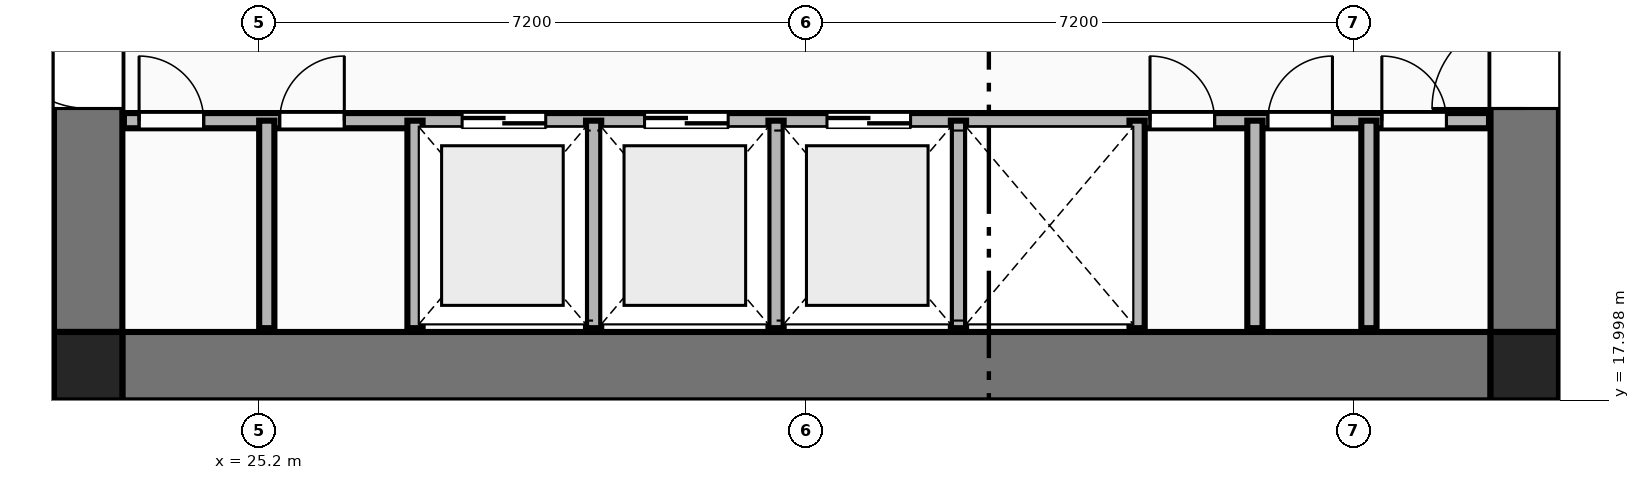
"""IFC4 building model, lengths in metres.
Left out: names, types, materials, properties, quantities, classifications, styles, units other than length and angle.
Written with IfcOpenShell. Run it as: python <this file> out.ifc"""

import sys

from ifc_helpers import new_model, si_unit, direction, frame, frame_2d, origin, origin_2d, place, context, subcontext, project, spatial, rectangle, extrude, element, fill, save


model = new_model("IFC4")
c1 = context("Model", 3, precision=1e-05, world=origin(), true_north=direction((0.0, 1.0)))
c2 = subcontext(c1, "Body", "Model", "MODEL_VIEW")
j1 = project(units=[si_unit("LENGTHUNIT", "METRE"), si_unit("PLANEANGLEUNIT", "RADIAN")], contexts=[c1])
p1 = place(None, origin())
s1 = spatial("IfcSite", under=j1, at=p1, CompositionType="ELEMENT")
p2 = place(p1, origin())
s2 = spatial("IfcBuilding", under=s1, at=p2, CompositionType="ELEMENT")
p3 = place(p2, frame((0.0, 0.0, 46.2)))
s3 = spatial("IfcBuildingStorey", under=s2, at=p3, CompositionType="ELEMENT", Elevation=46.2)
for number, where, z_axis, x_axis in (
    (1, (22.95, 18.45, 0.0), (0.0, 0.0, 1.0), (1.0, 0.0, 0.0)),
    (2, (41.85, 18.45, 0.0), (0.0, 0.0, 1.0), (1.0, 0.0, 0.0)),
):
    element("IfcColumn", number, at=place(p3, frame(where, z_axis=z_axis, x_axis=x_axis)), inside=s3, PredefinedType="COLUMN", context=c2, shape_type="SweptSolid", body=[
        extrude(rectangle(XDim=0.9, YDim=0.9, at=origin_2d()), origin(), (0.0, 0.0, 1.0), 3.55),
    ])
p4 = place(p3, frame((23.4, 18.45, 0.0), z_axis=(0.0, 0.0, 1.0), x_axis=(1.0, 0.0, 0.0)))
e3 = element("IfcWall", 3, at=p4, inside=s3, PredefinedType="SHEAR", context=c2, shape_type="SweptSolid", body=[
    extrude(rectangle(XDim=18.0, YDim=0.9, at=frame_2d((9.0, 0.0))), origin(), (0.0, 0.0, 1.0), 3.33),
])
p5 = place(p3, frame((22.95, 18.9, 0.0), z_axis=(0.0, 0.0, 1.0), x_axis=(0.0, 1.0, 0.0)))
e4 = element("IfcWall", 4, at=p5, inside=s3, PredefinedType="SHEAR", context=c2, shape_type="SweptSolid", body=[
    extrude(rectangle(XDim=14.0, YDim=0.9, at=frame_2d((7.0, 0.0))), origin(), (0.0, 0.0, 1.0), 3.33),
])
p6 = place(p5, frame((2.94, 0.0, 0.0)))
e5 = element("IfcOpeningElement", 5, at=p6, cuts=e4, PredefinedType="OPENING", context=c2, shape_type="SweptSolid", body=[
    extrude(rectangle(XDim=1.22, YDim=2.25, at=frame_2d((0.61, 1.125))), frame((0.0, 0.46, 0.0), z_axis=(0.0, -1.0, 0.0), x_axis=(1.0, 0.0, 0.0)), (0.0, 0.0, 1.0), 0.92),
])
p7 = place(p3, frame((41.85, 18.9, 0.0), z_axis=(0.0, 0.0, 1.0), x_axis=(0.0, 1.0, 0.0)))
e6 = element("IfcWall", 6, at=p7, inside=s3, PredefinedType="SHEAR", context=c2, shape_type="SweptSolid", body=[
    extrude(rectangle(XDim=14.0, YDim=0.9, at=frame_2d((7.0, 0.0))), origin(), (0.0, 0.0, 1.0), 3.33),
])
p8 = place(p7, frame((2.94, 0.0, 0.0)))
e7 = element("IfcOpeningElement", 7, at=p8, cuts=e6, PredefinedType="OPENING", context=c2, shape_type="SweptSolid", body=[
    extrude(rectangle(XDim=1.22, YDim=2.25, at=frame_2d((0.61, 1.125))), frame((0.0, 0.46, 0.0), z_axis=(0.0, -1.0, 0.0), x_axis=(1.0, 0.0, 0.0)), (0.0, 0.0, 1.0), 0.92),
])
p9 = place(p3, frame((23.42, 21.68, 0.0), z_axis=(0.0, 0.0, 1.0), x_axis=(1.0, 0.0, 0.0)))
e8 = element("IfcWall", 8, at=p9, inside=s3, PredefinedType="PLUMBINGWALL", context=c2, shape_type="SweptSolid", body=[
    extrude(rectangle(XDim=17.96, YDim=0.2, at=frame_2d((8.98, 0.0))), origin(), (0.0, 0.0, 1.0), 3.33),
])
p10 = place(p9, frame((4.45, 0.0, 0.0)))
e9 = element("IfcOpeningElement", 9, at=p10, cuts=e8, PredefinedType="OPENING", context=c2, shape_type="SweptSolid", body=[
    extrude(rectangle(XDim=1.1, YDim=2.2, at=frame_2d((0.55, 1.1))), frame((0.0, 0.11, 0.0), z_axis=(0.0, -1.0, 0.0), x_axis=(1.0, 0.0, 0.0)), (0.0, 0.0, 1.0), 0.22),
])
p11 = place(p9, frame((6.85, 0.0, 0.0)))
e10 = element("IfcOpeningElement", 10, at=p11, cuts=e8, PredefinedType="OPENING", context=c2, shape_type="SweptSolid", body=[
    extrude(rectangle(XDim=1.1, YDim=2.2, at=frame_2d((0.55, 1.1))), frame((0.0, 0.11, 0.0), z_axis=(0.0, -1.0, 0.0), x_axis=(1.0, 0.0, 0.0)), (0.0, 0.0, 1.0), 0.22),
])
p12 = place(p9, frame((9.25, 0.0, 0.0)))
e11 = element("IfcOpeningElement", 11, at=p12, cuts=e8, PredefinedType="OPENING", context=c2, shape_type="SweptSolid", body=[
    extrude(rectangle(XDim=1.1, YDim=2.2, at=frame_2d((0.55, 1.1))), frame((0.0, 0.11, 0.0), z_axis=(0.0, -1.0, 0.0), x_axis=(1.0, 0.0, 0.0)), (0.0, 0.0, 1.0), 0.22),
])
p13 = place(p9, frame((0.2, 0.0, 0.0)))
e12 = element("IfcOpeningElement", 12, at=p13, cuts=e8, PredefinedType="OPENING", context=c2, shape_type="SweptSolid", body=[
    extrude(rectangle(XDim=0.85, YDim=2.05, at=frame_2d((0.425, 1.025))), frame((0.0, 0.11, 0.0), z_axis=(0.0, -1.0, 0.0), x_axis=(1.0, 0.0, 0.0)), (0.0, 0.0, 1.0), 0.22),
])
p14 = place(p9, frame((2.05, 0.0, 0.0)))
e13 = element("IfcOpeningElement", 13, at=p14, cuts=e8, PredefinedType="OPENING", context=c2, shape_type="SweptSolid", body=[
    extrude(rectangle(XDim=0.85, YDim=2.05, at=frame_2d((0.425, 1.025))), frame((0.0, 0.11, 0.0), z_axis=(0.0, -1.0, 0.0), x_axis=(1.0, 0.0, 0.0)), (0.0, 0.0, 1.0), 0.22),
])
p15 = place(p9, frame((13.5, 0.0, 0.0)))
e14 = element("IfcOpeningElement", 14, at=p15, cuts=e8, PredefinedType="OPENING", context=c2, shape_type="SweptSolid", body=[
    extrude(rectangle(XDim=0.85, YDim=2.05, at=frame_2d((0.425, 1.025))), frame((0.0, 0.11, 0.0), z_axis=(0.0, -1.0, 0.0), x_axis=(1.0, 0.0, 0.0)), (0.0, 0.0, 1.0), 0.22),
])
p16 = place(p9, frame((15.05, 0.0, 0.0)))
e15 = element("IfcOpeningElement", 15, at=p16, cuts=e8, PredefinedType="OPENING", context=c2, shape_type="SweptSolid", body=[
    extrude(rectangle(XDim=0.85, YDim=2.05, at=frame_2d((0.425, 1.025))), frame((0.0, 0.11, 0.0), z_axis=(0.0, -1.0, 0.0), x_axis=(1.0, 0.0, 0.0)), (0.0, 0.0, 1.0), 0.22),
])
p17 = place(p9, frame((16.55, 0.0, 0.0)))
e16 = element("IfcOpeningElement", 16, at=p17, cuts=e8, PredefinedType="OPENING", context=c2, shape_type="SweptSolid", body=[
    extrude(rectangle(XDim=0.85, YDim=2.05, at=frame_2d((0.425, 1.025))), frame((0.0, 0.11, 0.0), z_axis=(0.0, -1.0, 0.0), x_axis=(1.0, 0.0, 0.0)), (0.0, 0.0, 1.0), 0.22),
])
for number, where, z_axis, x_axis in (
    (17, (27.25, 18.95, 0.0), (0.0, 0.0, 1.0), (0.0, 1.0, 0.0)),
    (18, (29.6, 18.95, 0.0), (0.0, 0.0, 1.0), (0.0, 1.0, 0.0)),
    (19, (32.0, 18.95, 0.0), (0.0, 0.0, 1.0), (0.0, 1.0, 0.0)),
    (20, (34.4, 18.95, 0.0), (0.0, 0.0, 1.0), (0.0, 1.0, 0.0)),
    (21, (36.75, 18.95, 0.0), (0.0, 0.0, 1.0), (0.0, 1.0, 0.0)),
    (22, (25.3, 18.95, 0.0), (0.0, 0.0, 1.0), (0.0, 1.0, 0.0)),
    (23, (38.3, 18.95, 0.0), (0.0, 0.0, 1.0), (0.0, 1.0, 0.0)),
    (24, (39.8, 18.95, 0.0), (0.0, 0.0, 1.0), (0.0, 1.0, 0.0)),
):
    element("IfcWall", number, at=place(p3, frame(where, z_axis=z_axis, x_axis=x_axis)), inside=s3, PredefinedType="PLUMBINGWALL", context=c2, shape_type="SweptSolid", body=[
        extrude(rectangle(XDim=2.73, YDim=0.2, at=frame_2d((1.365, 0.0))), origin(), (0.0, 0.0, 1.0), 3.33),
    ])
p18 = place(p6, origin())
e25 = element("IfcDoor", 25, at=p18, inside=s3, OperationType="SINGLE_SWING_RIGHT", PredefinedType="DOOR", context=c2, shape_type="SweptSolid", body=[
    extrude(rectangle(XDim=1.22, YDim=2.25, at=frame_2d((0.61, 1.125))), frame((0.0, 0.025, 0.0), z_axis=(0.0, -1.0, 0.0), x_axis=(1.0, 0.0, 0.0)), (0.0, 0.0, 1.0), 0.05),
])
fill(e5, e25)
p19 = place(p8, origin())
e26 = element("IfcDoor", 26, at=p19, inside=s3, OperationType="SINGLE_SWING_LEFT", PredefinedType="DOOR", context=c2, shape_type="SweptSolid", body=[
    extrude(rectangle(XDim=1.22, YDim=2.25, at=frame_2d((0.61, 1.125))), frame((0.0, 0.025, 0.0), z_axis=(0.0, -1.0, 0.0), x_axis=(1.0, 0.0, 0.0)), (0.0, 0.0, 1.0), 0.05),
])
fill(e7, e26)
p20 = place(p10, origin())
e27 = element("IfcDoor", 27, at=p20, inside=s3, OperationType="DOUBLE_DOOR_SLIDING", PredefinedType="DOOR", context=c2, shape_type="SweptSolid", body=[
    extrude(rectangle(XDim=1.1, YDim=2.2, at=frame_2d((0.55, 1.1))), frame((0.0, 0.025, 0.0), z_axis=(0.0, -1.0, 0.0), x_axis=(1.0, 0.0, 0.0)), (0.0, 0.0, 1.0), 0.05),
])
fill(e9, e27)
p21 = place(p11, origin())
e28 = element("IfcDoor", 28, at=p21, inside=s3, OperationType="DOUBLE_DOOR_SLIDING", PredefinedType="DOOR", context=c2, shape_type="SweptSolid", body=[
    extrude(rectangle(XDim=1.1, YDim=2.2, at=frame_2d((0.55, 1.1))), frame((0.0, 0.025, 0.0), z_axis=(0.0, -1.0, 0.0), x_axis=(1.0, 0.0, 0.0)), (0.0, 0.0, 1.0), 0.05),
])
fill(e10, e28)
p22 = place(p12, origin())
e29 = element("IfcDoor", 29, at=p22, inside=s3, OperationType="DOUBLE_DOOR_SLIDING", PredefinedType="DOOR", context=c2, shape_type="SweptSolid", body=[
    extrude(rectangle(XDim=1.1, YDim=2.2, at=frame_2d((0.55, 1.1))), frame((0.0, 0.025, 0.0), z_axis=(0.0, -1.0, 0.0), x_axis=(1.0, 0.0, 0.0)), (0.0, 0.0, 1.0), 0.05),
])
fill(e11, e29)
p23 = place(p13, origin())
e30 = element("IfcDoor", 30, at=p23, inside=s3, OperationType="SINGLE_SWING_LEFT", PredefinedType="DOOR", context=c2, shape_type="SweptSolid", body=[
    extrude(rectangle(XDim=0.85, YDim=2.05, at=frame_2d((0.425, 1.025))), frame((0.0, 0.025, 0.0), z_axis=(0.0, -1.0, 0.0), x_axis=(1.0, 0.0, 0.0)), (0.0, 0.0, 1.0), 0.05),
])
fill(e12, e30)
p24 = place(p14, origin())
e31 = element("IfcDoor", 31, at=p24, inside=s3, OperationType="SINGLE_SWING_RIGHT", PredefinedType="DOOR", context=c2, shape_type="SweptSolid", body=[
    extrude(rectangle(XDim=0.85, YDim=2.05, at=frame_2d((0.425, 1.025))), frame((0.0, 0.025, 0.0), z_axis=(0.0, -1.0, 0.0), x_axis=(1.0, 0.0, 0.0)), (0.0, 0.0, 1.0), 0.05),
])
fill(e13, e31)
p25 = place(p15, origin())
e32 = element("IfcDoor", 32, at=p25, inside=s3, OperationType="SINGLE_SWING_LEFT", PredefinedType="DOOR", context=c2, shape_type="SweptSolid", body=[
    extrude(rectangle(XDim=0.85, YDim=2.05, at=frame_2d((0.425, 1.025))), frame((0.0, 0.025, 0.0), z_axis=(0.0, -1.0, 0.0), x_axis=(1.0, 0.0, 0.0)), (0.0, 0.0, 1.0), 0.05),
])
fill(e14, e32)
p26 = place(p16, origin())
e33 = element("IfcDoor", 33, at=p26, inside=s3, OperationType="SINGLE_SWING_RIGHT", PredefinedType="DOOR", context=c2, shape_type="SweptSolid", body=[
    extrude(rectangle(XDim=0.85, YDim=2.05, at=frame_2d((0.425, 1.025))), frame((0.0, 0.025, 0.0), z_axis=(0.0, -1.0, 0.0), x_axis=(1.0, 0.0, 0.0)), (0.0, 0.0, 1.0), 0.05),
])
fill(e15, e33)
p27 = place(p17, origin())
e34 = element("IfcDoor", 34, at=p27, inside=s3, OperationType="SINGLE_SWING_LEFT", PredefinedType="DOOR", context=c2, shape_type="SweptSolid", body=[
    extrude(rectangle(XDim=0.85, YDim=2.05, at=frame_2d((0.425, 1.025))), frame((0.0, 0.025, 0.0), z_axis=(0.0, -1.0, 0.0), x_axis=(1.0, 0.0, 0.0)), (0.0, 0.0, 1.0), 0.05),
])
fill(e16, e34)
save(model, sys.argv[1])
